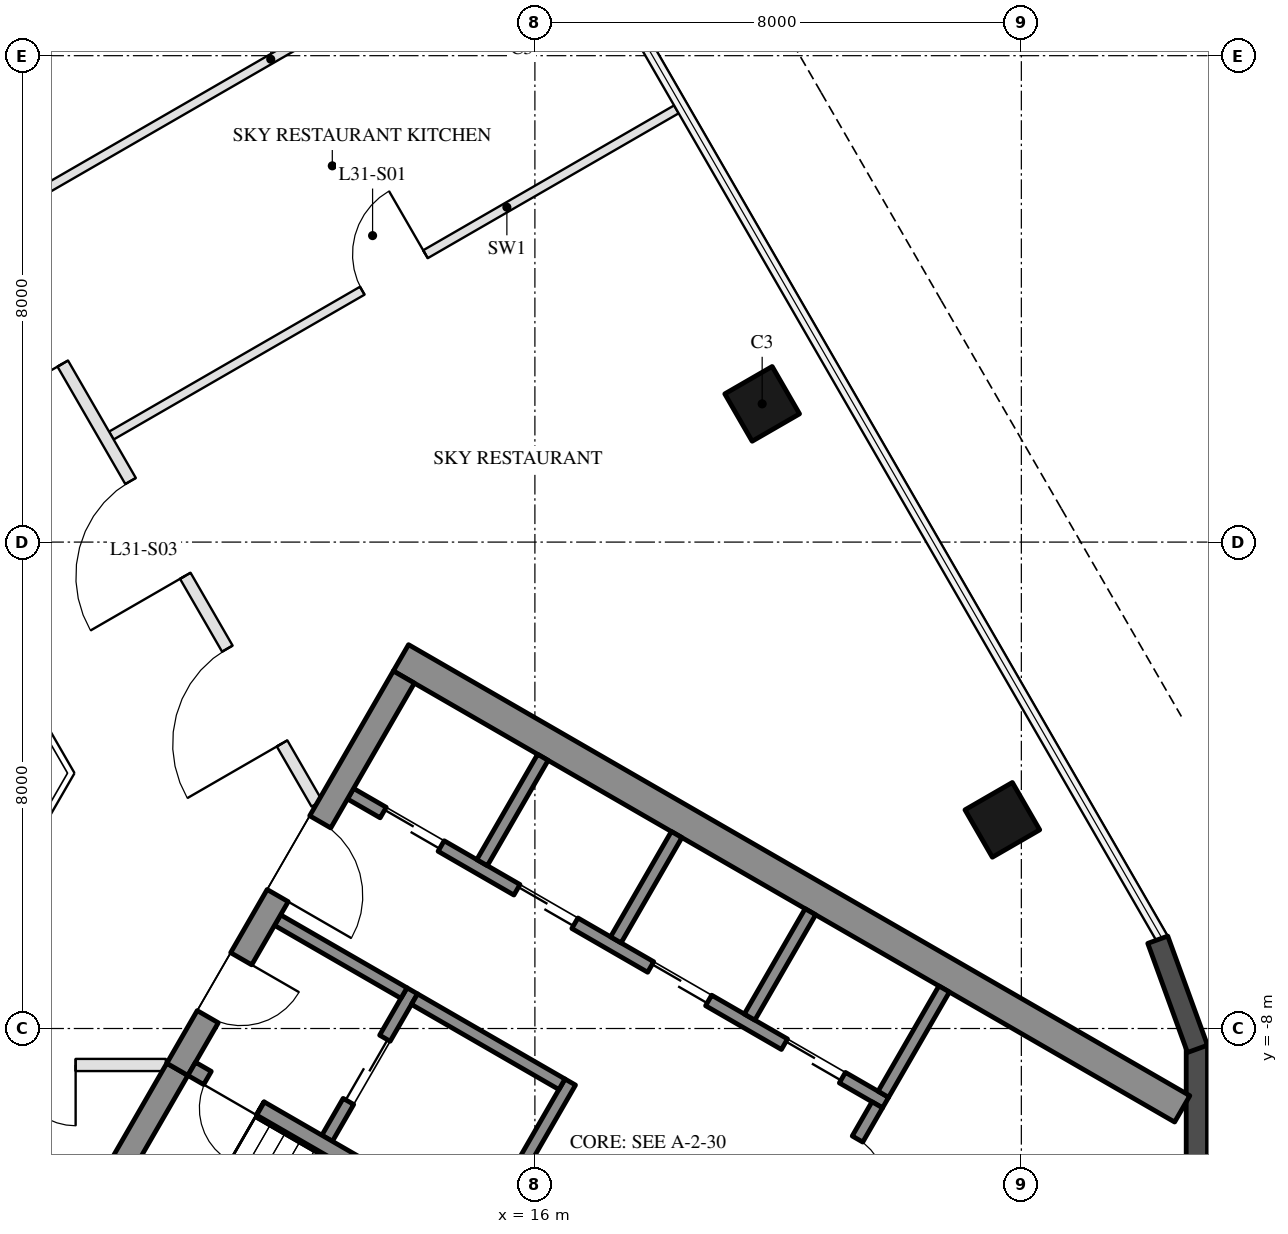
"""IFC4 building model, lengths in metres.
Left out: names, types, materials, properties, quantities, classifications, styles, units other than length and angle.
Written with IfcOpenShell. Run it as: python <this file> out.ifc"""

import sys

from ifc_helpers import new_model, si_unit, direction, frame, frame_2d, origin, origin_2d, place, context, subcontext, project, spatial, rectangle, hollow_rectangle, extrude, element, fill, save


model = new_model("IFC4")
c1 = context("Model", 3, precision=1e-05, world=origin(), true_north=direction((0.0, 1.0)))
c2 = subcontext(c1, "Body", "Model", "MODEL_VIEW")
j1 = project(units=[si_unit("LENGTHUNIT", "METRE"), si_unit("PLANEANGLEUNIT", "RADIAN")], contexts=[c1])
p1 = place(None, origin())
s1 = spatial("IfcSite", under=j1, at=p1, CompositionType="ELEMENT")
p2 = place(p1, origin())
s2 = spatial("IfcBuilding", under=s1, at=p2, CompositionType="ELEMENT")
p3 = place(p2, frame((0.0, 0.0, 131.6)))
s3 = spatial("IfcBuildingStorey", under=s2, at=p3, CompositionType="ELEMENT", Elevation=131.6)
for number, where, z_axis, x_axis in (
    (1, (23.688, -4.568, 0.0), (0.0, 0.0, 1.0), (-0.5, 0.866, 0.0)),
    (2, (19.738, 2.273, 0.0), (0.0, 0.0, 1.0), (-0.5, 0.866, 0.0)),
):
    element("IfcColumn", number, at=place(p3, frame(where, z_axis=z_axis, x_axis=x_axis)), inside=s3, PredefinedType="COLUMN", context=c2, shape_type="SweptSolid", body=[
        extrude(hollow_rectangle(XDim=0.9, YDim=0.9, WallThickness=0.04, at=origin_2d()), origin(), (0.0, 0.0, 1.0), 6.0),
    ])
for number, where, z_axis, x_axis in (
    (3, (26.244, -11.92, 0.0), (0.0, 0.0, 1.0), (0.342, 0.94, 0.0)),
    (4, (26.886, -10.185, 0.0), (0.0, 0.0, 1.0), (0.0, 1.0, 0.0)),
    (5, (26.897, -8.335, 0.0), (0.0, 0.0, 1.0), (-0.342, 0.94, 0.0)),
):
    element("IfcWall", number, at=place(p3, frame(where, z_axis=z_axis, x_axis=x_axis)), inside=s3, PredefinedType="SOLIDWALL", context=c2, shape_type="SweptSolid", body=[
        extrude(rectangle(XDim=1.91, YDim=0.35, at=frame_2d((0.955, 0.0))), origin(), (0.0, 0.0, 1.0), 5.7),
    ])
p4 = place(p3, frame((13.797, -1.903, 0.0), z_axis=(0.0, 0.0, 1.0), x_axis=(0.866025009528, -0.500000682871, 0.0)))
e6 = element("IfcWall", 6, at=p4, inside=s3, PredefinedType="SHEAR", context=c2, shape_type="SweptSolid", body=[
    extrude(rectangle(XDim=14.837, YDim=0.5, at=frame_2d((7.418, 0.0))), origin(), (0.0, 0.0, 1.0), 5.7),
])
p5 = place(p3, frame((15.181, -11.305, 0.0), z_axis=(0.0, 0.0, 1.0), x_axis=(0.49994636267, 0.866056369097, 0.0)))
e7 = element("IfcWall", 7, at=p5, inside=s3, PredefinedType="SHEAR", context=c2, shape_type="SweptSolid", body=[
    extrude(rectangle(XDim=2.8, YDim=0.2, at=frame_2d((1.4, 0.0))), origin(), (0.0, 0.0, 1.0), 5.7),
])
p6 = place(p3, frame((12.583, -9.805, 0.0), z_axis=(0.0, 0.0, 1.0), x_axis=(0.49994636267, 0.866056369097, 0.0)))
e8 = element("IfcWall", 8, at=p6, inside=s3, PredefinedType="SHEAR", context=c2, shape_type="SweptSolid", body=[
    extrude(rectangle(XDim=2.8, YDim=0.2, at=frame_2d((1.4, 0.0))), origin(), (0.0, 0.0, 1.0), 5.7),
])
p7 = place(p6, frame((0.7, 0.0, 0.0)))
e9 = element("IfcOpeningElement", 9, at=p7, cuts=e8, PredefinedType="OPENING", context=c2, shape_type="SweptSolid", body=[
    extrude(rectangle(XDim=1.2, YDim=2.1, at=frame_2d((0.6, 1.05))), frame((0.0, 0.11, 0.0), z_axis=(0.0, -1.0, 0.0), x_axis=(1.0, 0.0, 0.0)), (0.0, 0.0, 1.0), 0.22),
])
p8 = place(p3, frame((11.768, -6.217, 0.0), z_axis=(0.0, 0.0, 1.0), x_axis=(0.866050077142, -0.499957262057, 0.0)))
e10 = element("IfcWall", 10, at=p8, inside=s3, PredefinedType="SHEAR", context=c2, shape_type="SweptSolid", body=[
    extrude(rectangle(XDim=2.4, YDim=0.2, at=frame_2d((1.2, 0.0))), origin(), (0.0, 0.0, 1.0), 5.7),
])
p9 = place(p3, frame((14.02, -7.517, 0.0), z_axis=(0.0, 0.0, 1.0), x_axis=(0.866034573852, -0.49998411664, 0.0)))
e11 = element("IfcWall", 11, at=p9, inside=s3, PredefinedType="SHEAR", context=c2, shape_type="SweptSolid", body=[
    extrude(rectangle(XDim=2.8, YDim=0.2, at=frame_2d((1.4, 0.0))), origin(), (0.0, 0.0, 1.0), 5.7),
])
p10 = place(p3, frame((12.968, -4.138, 0.0), z_axis=(0.0, 0.0, 1.0), x_axis=(0.866028328073, -0.49999493495, 0.0)))
e12 = element("IfcWall", 12, at=p10, inside=s3, PredefinedType="SHEAR", context=c2, shape_type="SweptSolid", body=[
    extrude(rectangle(XDim=10.16, YDim=0.2, at=frame_2d((5.08, 0.0))), origin(), (0.0, 0.0, 1.0), 5.7),
])
p11 = place(p10, frame((0.62, 0.0, 0.0)))
e13 = element("IfcOpeningElement", 13, at=p11, cuts=e12, PredefinedType="OPENING", context=c2, shape_type="SweptSolid", body=[
    extrude(rectangle(XDim=1.1, YDim=2.1, at=frame_2d((0.55, 1.05))), frame((0.0, 0.11, 0.0), z_axis=(0.0, -1.0, 0.0), x_axis=(1.0, 0.0, 0.0)), (0.0, 0.0, 1.0), 0.22),
])
p12 = place(p10, frame((3.16, 0.0, 0.0)))
e14 = element("IfcOpeningElement", 14, at=p12, cuts=e12, PredefinedType="OPENING", context=c2, shape_type="SweptSolid", body=[
    extrude(rectangle(XDim=1.1, YDim=2.1, at=frame_2d((0.55, 1.05))), frame((0.0, 0.11, 0.0), z_axis=(0.0, -1.0, 0.0), x_axis=(1.0, 0.0, 0.0)), (0.0, 0.0, 1.0), 0.22),
])
p13 = place(p10, frame((5.7, 0.0, 0.0)))
e15 = element("IfcOpeningElement", 15, at=p13, cuts=e12, PredefinedType="OPENING", context=c2, shape_type="SweptSolid", body=[
    extrude(rectangle(XDim=1.1, YDim=2.1, at=frame_2d((0.55, 1.05))), frame((0.0, 0.11, 0.0), z_axis=(0.0, -1.0, 0.0), x_axis=(1.0, 0.0, 0.0)), (0.0, 0.0, 1.0), 0.22),
])
p14 = place(p10, frame((8.24, 0.0, 0.0)))
e16 = element("IfcOpeningElement", 16, at=p14, cuts=e12, PredefinedType="OPENING", context=c2, shape_type="SweptSolid", body=[
    extrude(rectangle(XDim=1.1, YDim=2.1, at=frame_2d((0.55, 1.05))), frame((0.0, 0.11, 0.0), z_axis=(0.0, -1.0, 0.0), x_axis=(1.0, 0.0, 0.0)), (0.0, 0.0, 1.0), 0.22),
])
p15 = place(p3, frame((20.43, -11.333, 0.0), z_axis=(0.0, 0.0, 1.0), x_axis=(0.500001309137, 0.866024647952, 0.0)))
e17 = element("IfcWall", 17, at=p15, inside=s3, PredefinedType="SHEAR", context=c2, shape_type="SweptSolid", body=[
    extrude(rectangle(XDim=2.4, YDim=0.2, at=frame_2d((1.2, 0.0))), origin(), (0.0, 0.0, 1.0), 5.7),
])
p16 = place(p15, frame((0.85, 0.0, 0.0)))
e18 = element("IfcOpeningElement", 18, at=p16, cuts=e17, PredefinedType="OPENING", context=c2, shape_type="SweptSolid", body=[
    extrude(rectangle(XDim=0.9, YDim=2.1, at=frame_2d((0.45, 1.05))), frame((0.0, 0.11, 0.0), z_axis=(0.0, -1.0, 0.0), x_axis=(1.0, 0.0, 0.0)), (0.0, 0.0, 1.0), 0.22),
])
for number, where, z_axis, x_axis in (
    (19, (15.131, -5.272, 0.0), (0.0, 0.0, 1.0), (0.5, 0.866, 0.0)),
    (20, (17.331, -6.542, 0.0), (0.0, 0.0, 1.0), (0.5, 0.866, 0.0)),
    (21, (19.531, -7.812, 0.0), (0.0, 0.0, 1.0), (0.5, 0.866, 0.0)),
    (22, (21.73, -9.082, 0.0), (0.0, 0.0, 1.0), (0.5, 0.866, 0.0)),
):
    element("IfcWall", number, at=place(p3, frame(where, z_axis=z_axis, x_axis=x_axis)), inside=s3, PredefinedType="SHEAR", context=c2, shape_type="SweptSolid", body=[
        extrude(rectangle(XDim=2.0, YDim=0.2, at=frame_2d((1.0, 0.0))), origin(), (0.0, 0.0, 1.0), 5.7),
    ])
p17 = place(p3, frame((8.845, -10.88, 0.0), z_axis=(0.0, 0.0, 1.0), x_axis=(0.499990435942, 0.866030925526, 0.0)))
e23 = element("IfcWall", 23, at=p17, inside=s3, PredefinedType="SHEAR", context=c2, shape_type="SweptSolid", body=[
    extrude(rectangle(XDim=2.55, YDim=0.4, at=frame_2d((1.275, 0.0))), origin(), (0.0, 0.0, 1.0), 5.7),
])
p18 = place(p3, frame((10.12, -8.672, 0.0), z_axis=(0.0, 0.0, 1.0), x_axis=(0.500008956979, 0.866020232408, 0.0)))
e24 = element("IfcWall", 24, at=p18, inside=s3, PredefinedType="SHEAR", context=c2, shape_type="SweptSolid", body=[
    extrude(rectangle(XDim=7.45, YDim=0.4, at=frame_2d((3.725, 0.0))), origin(), (0.0, 0.0, 1.0), 5.7),
])
p19 = place(p18, frame((1.0, 0.0, 0.0)))
e25 = element("IfcOpeningElement", 25, at=p19, cuts=e24, PredefinedType="OPENING", context=c2, shape_type="SweptSolid", body=[
    extrude(rectangle(XDim=1.1, YDim=2.1, at=frame_2d((0.55, 1.05))), frame((0.0, 0.21, 0.0), z_axis=(0.0, -1.0, 0.0), x_axis=(1.0, 0.0, 0.0)), (0.0, 0.0, 1.0), 0.42),
])
p20 = place(p18, frame((3.3, 0.0, 0.0)))
e26 = element("IfcOpeningElement", 26, at=p20, cuts=e24, PredefinedType="OPENING", context=c2, shape_type="SweptSolid", body=[
    extrude(rectangle(XDim=1.4, YDim=2.1, at=frame_2d((0.7, 1.05))), frame((0.0, 0.21, 0.0), z_axis=(0.0, -1.0, 0.0), x_axis=(1.0, 0.0, 0.0)), (0.0, 0.0, 1.0), 0.42),
])
p21 = place(p3, frame((10.356, -8.664, 0.0), z_axis=(0.0, 0.0, 1.0), x_axis=(0.866095317631, -0.499878886109, 0.0)))
e27 = element("IfcWall", 27, at=p21, inside=s3, PredefinedType="SHEAR", context=c2, shape_type="SweptSolid", body=[
    extrude(rectangle(XDim=1.306, YDim=0.25, at=frame_2d((0.653, 0.0))), origin(), (0.0, 0.0, 1.0), 5.7),
])
p22 = place(p21, frame((0.3, 0.0, 0.0)))
e28 = element("IfcOpeningElement", 28, at=p22, cuts=e27, PredefinedType="OPENING", context=c2, shape_type="SweptSolid", body=[
    extrude(rectangle(XDim=1.0, YDim=2.1, at=frame_2d((0.5, 1.05))), frame((0.0, 0.135, 0.0), z_axis=(0.0, -1.0, 0.0), x_axis=(1.0, 0.0, 0.0)), (0.0, 0.0, 1.0), 0.27),
])
p23 = place(p3, frame((11.487, -9.316, 0.0), z_axis=(0.0, 0.0, 1.0), x_axis=(0.866011695431, -0.500023742813, 0.0)))
e29 = element("IfcWall", 29, at=p23, inside=s3, PredefinedType="SHEAR", context=c2, shape_type="SweptSolid", body=[
    extrude(rectangle(XDim=5.144, YDim=0.25, at=frame_2d((2.572, 0.0))), origin(), (0.0, 0.0, 1.0), 5.7),
])
p24 = place(p3, frame((-9.93, -8.6, 0.0), z_axis=(0.0, 0.0, 1.0), x_axis=(1.0, 0.0, 0.0)))
e30 = element("IfcWall", 30, at=p24, inside=s3, PredefinedType="PARTITIONING", context=c2, shape_type="SweptSolid", body=[
    extrude(rectangle(XDim=19.861, YDim=0.2, at=frame_2d((9.93, 0.0))), origin(), (0.0, 0.0, 1.0), 4.91),
])
p25 = place(p24, frame((1.384, 0.0, 0.0)))
e31 = element("IfcOpeningElement", 31, at=p25, cuts=e30, PredefinedType="OPENING", context=c2, shape_type="SweptSolid", body=[
    extrude(rectangle(XDim=1.2, YDim=2.1, at=frame_2d((0.6, 1.05))), frame((0.0, 0.11, 0.0), z_axis=(0.0, -1.0, 0.0), x_axis=(1.0, 0.0, 0.0)), (0.0, 0.0, 1.0), 0.22),
])
p26 = place(p24, frame((6.012, 0.0, 0.0)))
e32 = element("IfcOpeningElement", 32, at=p26, cuts=e30, PredefinedType="OPENING", context=c2, shape_type="SweptSolid", body=[
    extrude(rectangle(XDim=1.8, YDim=2.4, at=frame_2d((0.9, 1.2))), frame((0.0, 0.11, 0.0), z_axis=(0.0, -1.0, 0.0), x_axis=(1.0, 0.0, 0.0)), (0.0, 0.0, 1.0), 0.22),
])
p27 = place(p24, frame((12.049, 0.0, 0.0)))
e33 = element("IfcOpeningElement", 33, at=p27, cuts=e30, PredefinedType="OPENING", context=c2, shape_type="SweptSolid", body=[
    extrude(rectangle(XDim=1.8, YDim=2.4, at=frame_2d((0.9, 1.2))), frame((0.0, 0.11, 0.0), z_axis=(0.0, -1.0, 0.0), x_axis=(1.0, 0.0, 0.0)), (0.0, 0.0, 1.0), 0.22),
])
p28 = place(p24, frame((17.377, 0.0, 0.0)))
e34 = element("IfcOpeningElement", 34, at=p28, cuts=e30, PredefinedType="OPENING", context=c2, shape_type="SweptSolid", body=[
    extrude(rectangle(XDim=1.0, YDim=2.1, at=frame_2d((0.5, 1.05))), frame((0.0, 0.11, 0.0), z_axis=(0.0, -1.0, 0.0), x_axis=(1.0, 0.0, 0.0)), (0.0, 0.0, 1.0), 0.22),
])
p29 = place(p3, frame((18.327, 7.117, 0.0), z_axis=(0.0, 0.0, 1.0), x_axis=(-0.866026447599, -0.499998192055, 0.0)))
e35 = element("IfcWall", 35, at=p29, inside=s3, PredefinedType="PARTITIONING", context=c2, shape_type="SweptSolid", body=[
    extrude(rectangle(XDim=10.73, YDim=0.15, at=frame_2d((5.365, 0.0))), origin(), (0.0, 0.0, 1.0), 5.7),
])
p30 = place(p29, frame((4.765, 0.0, 0.0)))
e36 = element("IfcOpeningElement", 36, at=p30, cuts=e35, PredefinedType="OPENING", context=c2, shape_type="SweptSolid", body=[
    extrude(rectangle(XDim=1.2, YDim=2.1, at=frame_2d((0.6, 1.05))), frame((0.0, 0.085, 0.0), z_axis=(0.0, -1.0, 0.0), x_axis=(1.0, 0.0, 0.0)), (0.0, 0.0, 1.0), 0.17),
])
p31 = place(p3, frame((16.302, 10.624, 0.0), z_axis=(0.0, 0.0, 1.0), x_axis=(-0.866026447599, -0.499998192055, 0.0)))
e37 = element("IfcWall", 37, at=p31, inside=s3, PredefinedType="PARTITIONING", context=c2, shape_type="SweptSolid", body=[
    extrude(rectangle(XDim=10.73, YDim=0.15, at=frame_2d((5.365, 0.0))), origin(), (0.0, 0.0, 1.0), 5.7),
])
p32 = place(p3, frame((12.413, -4.3, 0.0), z_axis=(0.0, 0.0, 1.0), x_axis=(-0.50000478328, 0.866022642139, 0.0)))
e38 = element("IfcWall", 38, at=p32, inside=s3, PredefinedType="PARTITIONING", context=c2, shape_type="SweptSolid", body=[
    extrude(rectangle(XDim=19.861, YDim=0.2, at=frame_2d((9.931, 0.0))), origin(), (0.0, 0.0, 1.0), 4.91),
])
p33 = place(p32, frame((1.142, 0.0, 0.0)))
e39 = element("IfcOpeningElement", 39, at=p33, cuts=e38, PredefinedType="OPENING", context=c2, shape_type="SweptSolid", body=[
    extrude(rectangle(XDim=1.8, YDim=2.4, at=frame_2d((0.9, 1.2))), frame((0.0, 0.11, 0.0), z_axis=(0.0, -1.0, 0.0), x_axis=(1.0, 0.0, 0.0)), (0.0, 0.0, 1.0), 0.22),
])
p34 = place(p32, frame((4.325, 0.0, 0.0)))
e40 = element("IfcOpeningElement", 40, at=p34, cuts=e38, PredefinedType="OPENING", context=c2, shape_type="SweptSolid", body=[
    extrude(rectangle(XDim=1.8, YDim=2.4, at=frame_2d((0.9, 1.2))), frame((0.0, 0.11, 0.0), z_axis=(0.0, -1.0, 0.0), x_axis=(1.0, 0.0, 0.0)), (0.0, 0.0, 1.0), 0.22),
])
p35 = place(p32, frame((8.355, 0.0, 0.0)))
e41 = element("IfcOpeningElement", 41, at=p35, cuts=e38, PredefinedType="OPENING", context=c2, shape_type="SweptSolid", body=[
    extrude(rectangle(XDim=1.2, YDim=2.1, at=frame_2d((0.6, 1.05))), frame((0.0, 0.11, 0.0), z_axis=(0.0, -1.0, 0.0), x_axis=(1.0, 0.0, 0.0)), (0.0, 0.0, 1.0), 0.22),
])
p36 = place(p32, frame((12.573, 0.0, 0.0)))
e42 = element("IfcOpeningElement", 42, at=p36, cuts=e38, PredefinedType="OPENING", context=c2, shape_type="SweptSolid", body=[
    extrude(rectangle(XDim=1.2, YDim=2.1, at=frame_2d((0.6, 1.05))), frame((0.0, 0.11, 0.0), z_axis=(0.0, -1.0, 0.0), x_axis=(1.0, 0.0, 0.0)), (0.0, 0.0, 1.0), 0.22),
])
p37 = place(p32, frame((17.032, 0.0, 0.0)))
e43 = element("IfcOpeningElement", 43, at=p37, cuts=e38, PredefinedType="OPENING", context=c2, shape_type="SweptSolid", body=[
    extrude(rectangle(XDim=1.2, YDim=2.1, at=frame_2d((0.6, 1.05))), frame((0.0, 0.11, 0.0), z_axis=(0.0, -1.0, 0.0), x_axis=(1.0, 0.0, 0.0)), (0.0, 0.0, 1.0), 0.22),
])
p38 = place(p7, origin())
e44 = element("IfcDoor", 44, at=p38, inside=s3, OperationType="DOUBLE_DOOR_SLIDING", PredefinedType="DOOR", context=c2, shape_type="SweptSolid", body=[
    extrude(rectangle(XDim=1.2, YDim=2.1, at=frame_2d((0.6, 1.05))), frame((0.0, 0.025, 0.0), z_axis=(0.0, -1.0, 0.0), x_axis=(1.0, 0.0, 0.0)), (0.0, 0.0, 1.0), 0.05),
])
fill(e9, e44)
p39 = place(p11, origin())
e45 = element("IfcDoor", 45, at=p39, inside=s3, OperationType="DOUBLE_DOOR_SLIDING", PredefinedType="DOOR", context=c2, shape_type="SweptSolid", body=[
    extrude(rectangle(XDim=1.1, YDim=2.1, at=frame_2d((0.55, 1.05))), frame((0.0, 0.025, 0.0), z_axis=(0.0, -1.0, 0.0), x_axis=(1.0, 0.0, 0.0)), (0.0, 0.0, 1.0), 0.05),
])
fill(e13, e45)
p40 = place(p12, origin())
e46 = element("IfcDoor", 46, at=p40, inside=s3, OperationType="DOUBLE_DOOR_SLIDING", PredefinedType="DOOR", context=c2, shape_type="SweptSolid", body=[
    extrude(rectangle(XDim=1.1, YDim=2.1, at=frame_2d((0.55, 1.05))), frame((0.0, 0.025, 0.0), z_axis=(0.0, -1.0, 0.0), x_axis=(1.0, 0.0, 0.0)), (0.0, 0.0, 1.0), 0.05),
])
fill(e14, e46)
p41 = place(p13, origin())
e47 = element("IfcDoor", 47, at=p41, inside=s3, OperationType="DOUBLE_DOOR_SLIDING", PredefinedType="DOOR", context=c2, shape_type="SweptSolid", body=[
    extrude(rectangle(XDim=1.1, YDim=2.1, at=frame_2d((0.55, 1.05))), frame((0.0, 0.025, 0.0), z_axis=(0.0, -1.0, 0.0), x_axis=(1.0, 0.0, 0.0)), (0.0, 0.0, 1.0), 0.05),
])
fill(e15, e47)
p42 = place(p14, origin())
e48 = element("IfcDoor", 48, at=p42, inside=s3, OperationType="DOUBLE_DOOR_SLIDING", PredefinedType="DOOR", context=c2, shape_type="SweptSolid", body=[
    extrude(rectangle(XDim=1.1, YDim=2.1, at=frame_2d((0.55, 1.05))), frame((0.0, 0.025, 0.0), z_axis=(0.0, -1.0, 0.0), x_axis=(1.0, 0.0, 0.0)), (0.0, 0.0, 1.0), 0.05),
])
fill(e16, e48)
p43 = place(p16, frame((0.9, 0.0, 0.0), z_axis=(0.0, 0.0, 1.0), x_axis=(-1.0, 0.0, 0.0)))
e49 = element("IfcDoor", 49, at=p43, inside=s3, OperationType="SINGLE_SWING_RIGHT", PredefinedType="DOOR", context=c2, shape_type="SweptSolid", body=[
    extrude(rectangle(XDim=0.9, YDim=2.1, at=frame_2d((0.45, 1.05))), frame((0.0, 0.025, 0.0), z_axis=(0.0, -1.0, 0.0), x_axis=(1.0, 0.0, 0.0)), (0.0, 0.0, 1.0), 0.05),
])
fill(e18, e49)
p44 = place(p19, frame((1.1, 0.0, 0.0), z_axis=(0.0, 0.0, 1.0), x_axis=(-1.0, 0.0, 0.0)))
e50 = element("IfcDoor", 50, at=p44, inside=s3, OperationType="SINGLE_SWING_LEFT", PredefinedType="DOOR", context=c2, shape_type="SweptSolid", body=[
    extrude(rectangle(XDim=1.1, YDim=2.1, at=frame_2d((0.55, 1.05))), frame((0.0, 0.025, 0.0), z_axis=(0.0, -1.0, 0.0), x_axis=(1.0, 0.0, 0.0)), (0.0, 0.0, 1.0), 0.05),
])
fill(e25, e50)
p45 = place(p20, frame((1.4, 0.0, 0.0), z_axis=(0.0, 0.0, 1.0), x_axis=(-1.0, 0.0, 0.0)))
e51 = element("IfcDoor", 51, at=p45, inside=s3, OperationType="DOUBLE_DOOR_SINGLE_SWING", PredefinedType="DOOR", context=c2, shape_type="SweptSolid", body=[
    extrude(rectangle(XDim=1.4, YDim=2.1, at=frame_2d((0.7, 1.05))), frame((0.0, 0.025, 0.0), z_axis=(0.0, -1.0, 0.0), x_axis=(1.0, 0.0, 0.0)), (0.0, 0.0, 1.0), 0.05),
])
fill(e26, e51)
p46 = place(p22, frame((1.0, 0.0, 0.0), z_axis=(0.0, 0.0, 1.0), x_axis=(-1.0, 0.0, 0.0)))
e52 = element("IfcDoor", 52, at=p46, inside=s3, OperationType="SINGLE_SWING_LEFT", PredefinedType="DOOR", context=c2, shape_type="SweptSolid", body=[
    extrude(rectangle(XDim=1.0, YDim=2.1, at=frame_2d((0.5, 1.05))), frame((0.0, 0.025, 0.0), z_axis=(0.0, -1.0, 0.0), x_axis=(1.0, 0.0, 0.0)), (0.0, 0.0, 1.0), 0.05),
])
fill(e28, e52)
p47 = place(p30, frame((1.2, 0.0, 0.0), z_axis=(0.0, 0.0, 1.0), x_axis=(-1.0, 0.0, 0.0)))
e53 = element("IfcDoor", 53, at=p47, inside=s3, OperationType="SINGLE_SWING_RIGHT", PredefinedType="DOOR", context=c2, shape_type="SweptSolid", body=[
    extrude(rectangle(XDim=1.2, YDim=2.1, at=frame_2d((0.6, 1.05))), frame((0.0, 0.025, 0.0), z_axis=(0.0, -1.0, 0.0), x_axis=(1.0, 0.0, 0.0)), (0.0, 0.0, 1.0), 0.05),
])
fill(e36, e53)
p48 = place(p33, origin())
e54 = element("IfcDoor", 54, at=p48, inside=s3, OperationType="DOUBLE_DOOR_SINGLE_SWING", PredefinedType="DOOR", context=c2, shape_type="SweptSolid", body=[
    extrude(rectangle(XDim=1.8, YDim=2.4, at=frame_2d((0.9, 1.2))), frame((0.0, 0.025, 0.0), z_axis=(0.0, -1.0, 0.0), x_axis=(1.0, 0.0, 0.0)), (0.0, 0.0, 1.0), 0.05),
])
fill(e39, e54)
p49 = place(p34, origin())
e55 = element("IfcDoor", 55, at=p49, inside=s3, OperationType="DOUBLE_DOOR_SINGLE_SWING", PredefinedType="DOOR", context=c2, shape_type="SweptSolid", body=[
    extrude(rectangle(XDim=1.8, YDim=2.4, at=frame_2d((0.9, 1.2))), frame((0.0, 0.025, 0.0), z_axis=(0.0, -1.0, 0.0), x_axis=(1.0, 0.0, 0.0)), (0.0, 0.0, 1.0), 0.05),
])
fill(e40, e55)
p50 = place(p35, origin())
e56 = element("IfcDoor", 56, at=p50, inside=s3, OperationType="SINGLE_SWING_LEFT", PredefinedType="DOOR", context=c2, shape_type="SweptSolid", body=[
    extrude(rectangle(XDim=1.2, YDim=2.1, at=frame_2d((0.6, 1.05))), frame((0.0, 0.025, 0.0), z_axis=(0.0, -1.0, 0.0), x_axis=(1.0, 0.0, 0.0)), (0.0, 0.0, 1.0), 0.05),
])
fill(e41, e56)
p51 = place(p28, frame((1.0, 0.0, 0.0), z_axis=(0.0, 0.0, 1.0), x_axis=(-1.0, 0.0, 0.0)))
e57 = element("IfcDoor", 57, at=p51, inside=s3, OperationType="SINGLE_SWING_LEFT", PredefinedType="DOOR", context=c2, shape_type="SweptSolid", body=[
    extrude(rectangle(XDim=1.0, YDim=2.1, at=frame_2d((0.5, 1.05))), frame((0.0, 0.025, 0.0), z_axis=(0.0, -1.0, 0.0), x_axis=(1.0, 0.0, 0.0)), (0.0, 0.0, 1.0), 0.05),
])
fill(e34, e57)
save(model, sys.argv[1])
